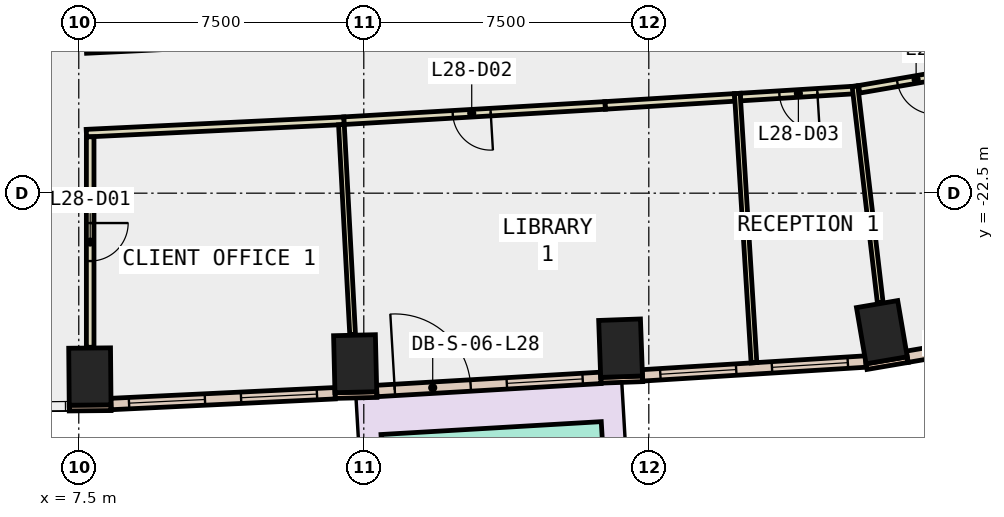
"""IFC4 building model, lengths in metres.
Left out: names, types, materials, properties, quantities, classifications, styles, units other than length and angle.
Written with IfcOpenShell. Run it as: python <this file> out.ifc"""

import sys

from ifc_helpers import new_model, si_unit, direction, frame, frame_2d, origin, origin_2d, place, context, subcontext, project, spatial, rectangle, extrude, element, fill, save


model = new_model("IFC4")
c1 = context("Model", 3, precision=1e-05, world=origin(), true_north=direction((0.0, 1.0)))
c2 = subcontext(c1, "Body", "Model", "MODEL_VIEW")
j1 = project(units=[si_unit("LENGTHUNIT", "METRE"), si_unit("PLANEANGLEUNIT", "RADIAN")], contexts=[c1])
p1 = place(None, origin())
s1 = spatial("IfcSite", under=j1, at=p1, CompositionType="ELEMENT")
p2 = place(p1, origin())
s2 = spatial("IfcBuilding", under=s1, at=p2, CompositionType="ELEMENT")
p3 = place(p2, frame((0.0, 0.0, 128.6)))
s3 = spatial("IfcBuildingStorey", under=s2, at=p3, CompositionType="ELEMENT", Elevation=128.6)
for number, where, z_axis, x_axis in (
    (1, (7.792, -27.325, -0.4), (0.0, 0.0, 1.0), (1.0, 0.009, 0.0)),
    (2, (14.773, -26.987, -0.4), (0.0, 0.0, 1.0), (1.0, 0.024, 0.0)),
    (3, (21.757, -26.579, -0.4), (0.0, 0.0, 1.0), (0.999, 0.035, 0.0)),
    (4, (28.633, -26.158, -0.4), (0.0, 0.0, 1.0), (0.986, 0.168, 0.0)),
):
    element("IfcColumn", number, at=place(p3, frame(where, z_axis=z_axis, x_axis=x_axis)), inside=s3, PredefinedType="COLUMN", context=c2, shape_type="SweptSolid", body=[
        extrude(rectangle(XDim=1.1, YDim=1.5, at=origin_2d()), origin(), (0.0, 0.0, 1.0), 4.0),
    ])
p4 = place(p3, frame((7.249, -28.155, 0.0), z_axis=(0.0, 0.0, 1.0), x_axis=(0.99995860686, 0.009098602504, 0.0)))
e5 = element("IfcWall", 5, at=p4, inside=s3, PredefinedType="STANDARD", context=c2, shape_type="SweptSolid", body=[
    extrude(rectangle(XDim=1.1, YDim=0.15, at=frame_2d((0.55, 0.0))), origin(), (0.0, 0.0, 1.0), 3.6),
])
p5 = place(p3, frame((14.243, -27.825, 0.0), z_axis=(0.0, 0.0, 1.0), x_axis=(0.999723421029, 0.023517683673, 0.0)))
e6 = element("IfcWall", 6, at=p5, inside=s3, PredefinedType="STANDARD", context=c2, shape_type="SweptSolid", body=[
    extrude(rectangle(XDim=1.1, YDim=0.15, at=frame_2d((0.55, 0.0))), origin(), (0.0, 0.0, 1.0), 3.6),
])
p6 = place(p3, frame((21.237, -27.423, 0.0), z_axis=(0.0, 0.0, 1.0), x_axis=(0.999368780235, 0.035525217693, 0.0)))
e7 = element("IfcWall", 7, at=p6, inside=s3, PredefinedType="STANDARD", context=c2, shape_type="SweptSolid", body=[
    extrude(rectangle(XDim=1.1, YDim=0.15, at=frame_2d((0.55, 0.0))), origin(), (0.0, 0.0, 1.0), 3.6),
])
p7 = place(p3, frame((28.229, -27.064, 0.0), z_axis=(0.0, 0.0, 1.0), x_axis=(0.985763338892, 0.168138751323, 0.0)))
e8 = element("IfcWall", 8, at=p7, inside=s3, PredefinedType="STANDARD", context=c2, shape_type="SweptSolid", body=[
    extrude(rectangle(XDim=1.101, YDim=0.15, at=frame_2d((0.55, 0.0))), origin(), (0.0, 0.0, 1.0), 3.6),
])
p8 = place(p3, frame((8.347, -28.048, 0.0), z_axis=(0.0, 0.0, 1.0), x_axis=(0.998840459798, 0.048142869367, 0.0)))
e9 = element("IfcWall", 9, at=p8, inside=s3, PredefinedType="STANDARD", context=c2, shape_type="SweptSolid", body=[
    extrude(rectangle(XDim=5.903, YDim=0.3, at=frame_2d((2.951, 0.0))), origin(), (0.0, 0.0, 1.0), 3.6),
])
p9 = place(p8, frame((0.476, 0.0, 0.9)))
e10 = element("IfcOpeningElement", 10, at=p9, cuts=e9, PredefinedType="OPENING", context=c2, shape_type="SweptSolid", body=[
    extrude(rectangle(XDim=2.0, YDim=2.6, at=frame_2d((1.0, 1.3))), frame((0.0, 0.16, 0.0), z_axis=(0.0, -1.0, 0.0), x_axis=(1.0, 0.0, 0.0)), (0.0, 0.0, 1.0), 0.32),
])
p10 = place(p8, frame((3.427, 0.0, 0.9)))
e11 = element("IfcOpeningElement", 11, at=p10, cuts=e9, PredefinedType="OPENING", context=c2, shape_type="SweptSolid", body=[
    extrude(rectangle(XDim=2.0, YDim=2.6, at=frame_2d((1.0, 1.3))), frame((0.0, 0.16, 0.0), z_axis=(0.0, -1.0, 0.0), x_axis=(1.0, 0.0, 0.0)), (0.0, 0.0, 1.0), 0.32),
])
p11 = place(p3, frame((15.34, -27.705, 0.0), z_axis=(0.0, 0.0, 1.0), x_axis=(0.998292147894, 0.058419067546, 0.0)))
e12 = element("IfcWall", 12, at=p11, inside=s3, PredefinedType="STANDARD", context=c2, shape_type="SweptSolid", body=[
    extrude(rectangle(XDim=5.905, YDim=0.3, at=frame_2d((2.953, 0.0))), origin(), (0.0, 0.0, 1.0), 3.6),
])
p12 = place(p11, frame((0.476, 0.0, 0.0)))
e13 = element("IfcOpeningElement", 13, at=p12, cuts=e12, PredefinedType="OPENING", context=c2, shape_type="SweptSolid", body=[
    extrude(rectangle(XDim=2.0, YDim=2.4, at=frame_2d((1.0, 1.2))), frame((0.0, 0.16, 0.0), z_axis=(0.0, -1.0, 0.0), x_axis=(1.0, 0.0, 0.0)), (0.0, 0.0, 1.0), 0.32),
])
p13 = place(p11, frame((3.429, 0.0, 0.9)))
e14 = element("IfcOpeningElement", 14, at=p13, cuts=e12, PredefinedType="OPENING", context=c2, shape_type="SweptSolid", body=[
    extrude(rectangle(XDim=2.0, YDim=2.6, at=frame_2d((1.0, 1.3))), frame((0.0, 0.16, 0.0), z_axis=(0.0, -1.0, 0.0), x_axis=(1.0, 0.0, 0.0)), (0.0, 0.0, 1.0), 0.32),
])
p14 = place(p3, frame((22.332, -27.294, 0.0), z_axis=(0.0, 0.0, 1.0), x_axis=(0.998086636664, 0.061830944626, 0.0)))
e15 = element("IfcWall", 15, at=p14, inside=s3, PredefinedType="STANDARD", context=c2, shape_type="SweptSolid", body=[
    extrude(rectangle(XDim=5.887, YDim=0.3, at=frame_2d((2.944, 0.0))), origin(), (0.0, 0.0, 1.0), 3.6),
])
p15 = place(p14, frame((0.472, 0.0, 0.9)))
e16 = element("IfcOpeningElement", 16, at=p15, cuts=e15, PredefinedType="OPENING", context=c2, shape_type="SweptSolid", body=[
    extrude(rectangle(XDim=2.0, YDim=2.6, at=frame_2d((1.0, 1.3))), frame((0.0, 0.16, 0.0), z_axis=(0.0, -1.0, 0.0), x_axis=(1.0, 0.0, 0.0)), (0.0, 0.0, 1.0), 0.32),
])
p16 = place(p14, frame((3.415, 0.0, 0.9)))
e17 = element("IfcOpeningElement", 17, at=p16, cuts=e15, PredefinedType="OPENING", context=c2, shape_type="SweptSolid", body=[
    extrude(rectangle(XDim=2.0, YDim=2.6, at=frame_2d((1.0, 1.3))), frame((0.0, 0.16, 0.0), z_axis=(0.0, -1.0, 0.0), x_axis=(1.0, 0.0, 0.0)), (0.0, 0.0, 1.0), 0.32),
])
p17 = place(p3, frame((29.3, -26.804, 0.0), z_axis=(0.0, 0.0, 1.0), x_axis=(0.985504881957, 0.169647067875, 0.0)))
e18 = element("IfcWall", 18, at=p17, inside=s3, PredefinedType="STANDARD", context=c2, shape_type="SweptSolid", body=[
    extrude(rectangle(XDim=4.374, YDim=0.3, at=frame_2d((2.187, 0.0))), origin(), (0.0, 0.0, 1.0), 3.6),
])
p18 = place(p17, frame((1.487, 0.0, 0.9)))
e19 = element("IfcOpeningElement", 19, at=p18, cuts=e18, PredefinedType="OPENING", context=c2, shape_type="SweptSolid", body=[
    extrude(rectangle(XDim=1.4, YDim=2.6, at=frame_2d((0.7, 1.3))), frame((0.0, 0.16, 0.0), z_axis=(0.0, -1.0, 0.0), x_axis=(1.0, 0.0, 0.0)), (0.0, 0.0, 1.0), 0.32),
])
p19 = place(p3, frame((15.476, -29.25, 0.0), z_axis=(0.0, 0.0, 1.0), x_axis=(0.998292739561, 0.058408955992, 0.0)))
e20 = element("IfcWall", 20, at=p19, inside=s3, PredefinedType="STANDARD", context=c2, shape_type="SweptSolid", body=[
    extrude(rectangle(XDim=5.806, YDim=0.8, at=frame_2d((2.903, 0.0))), origin(), (0.0, 0.0, 1.0), 0.8),
])
p20 = place(p3, frame((7.7, -18.719, 0.0), z_axis=(0.0, 0.0, 1.0), x_axis=(0.998829118209, 0.048377604502, 0.0)))
e21 = element("IfcWall", 21, at=p20, inside=s3, PredefinedType="PARTITIONING", context=c2, shape_type="SweptSolid", body=[
    extrude(rectangle(XDim=6.596, YDim=0.2, at=frame_2d((3.298, 0.0))), origin(), (0.0, 0.0, 1.0), 3.6),
])
p21 = place(p3, frame((14.481, -20.594, 0.0), z_axis=(0.0, 0.0, 1.0), x_axis=(-0.998839976403, -0.048152897512, 0.0)))
e22 = element("IfcWall", 22, at=p21, inside=s3, PredefinedType="PARTITIONING", context=c2, shape_type="SweptSolid", body=[
    extrude(rectangle(XDim=6.789, YDim=0.2, at=frame_2d((3.395, 0.0))), origin(), (0.0, 0.0, 1.0), 3.6),
])
p22 = place(p3, frame((24.76, -19.98, 0.0), z_axis=(0.0, 0.0, 1.0), x_axis=(-0.998092137917, -0.061742078267, 0.0)))
e23 = element("IfcWall", 23, at=p22, inside=s3, PredefinedType="PARTITIONING", context=c2, shape_type="SweptSolid", body=[
    extrude(rectangle(XDim=3.417, YDim=0.2, at=frame_2d((1.708, 0.0))), origin(), (0.0, 0.0, 1.0), 3.6),
])
p23 = place(p3, frame((21.35, -20.191, 0.0), z_axis=(0.0, 0.0, 1.0), x_axis=(-0.998291094182, -0.058437071087, 0.0)))
e24 = element("IfcWall", 24, at=p23, inside=s3, PredefinedType="PARTITIONING", context=c2, shape_type="SweptSolid", body=[
    extrude(rectangle(XDim=6.881, YDim=0.2, at=frame_2d((3.44, 0.0))), origin(), (0.0, 0.0, 1.0), 3.6),
])
p24 = place(p23, frame((3.016, 0.0, 0.0)))
e25 = element("IfcOpeningElement", 25, at=p24, cuts=e24, PredefinedType="OPENING", context=c2, shape_type="SweptSolid", body=[
    extrude(rectangle(XDim=1.0, YDim=2.1, at=frame_2d((0.5, 1.05))), frame((0.0, 0.11, 0.0), z_axis=(0.0, -1.0, 0.0), x_axis=(1.0, 0.0, 0.0)), (0.0, 0.0, 1.0), 0.22),
])
p25 = place(p3, frame((27.962, -19.782, 0.0), z_axis=(0.0, 0.0, 1.0), x_axis=(-0.998088756763, -0.061796712082, 0.0)))
e26 = element("IfcWall", 26, at=p25, inside=s3, PredefinedType="PARTITIONING", context=c2, shape_type="SweptSolid", body=[
    extrude(rectangle(XDim=3.058, YDim=0.2, at=frame_2d((1.529, 0.0))), origin(), (0.0, 0.0, 1.0), 3.6),
])
p26 = place(p25, frame((1.029, 0.0, 0.0)))
e27 = element("IfcOpeningElement", 27, at=p26, cuts=e26, PredefinedType="OPENING", context=c2, shape_type="SweptSolid", body=[
    extrude(rectangle(XDim=1.0, YDim=2.1, at=frame_2d((0.5, 1.05))), frame((0.0, 0.11, 0.0), z_axis=(0.0, -1.0, 0.0), x_axis=(1.0, 0.0, 0.0)), (0.0, 0.0, 1.0), 0.22),
])
p27 = place(p3, frame((31.033, -19.251, 0.0), z_axis=(0.0, 0.0, 1.0), x_axis=(-0.985494394638, -0.169707979005, 0.0)))
e28 = element("IfcWall", 28, at=p27, inside=s3, PredefinedType="PARTITIONING", context=c2, shape_type="SweptSolid", body=[
    extrude(rectangle(XDim=3.041, YDim=0.2, at=frame_2d((1.521, 0.0))), origin(), (0.0, 0.0, 1.0), 3.6),
])
p28 = place(p27, frame((1.021, 0.0, 0.0)))
e29 = element("IfcOpeningElement", 29, at=p28, cuts=e28, PredefinedType="OPENING", context=c2, shape_type="SweptSolid", body=[
    extrude(rectangle(XDim=1.0, YDim=2.1, at=frame_2d((0.5, 1.05))), frame((0.0, 0.11, 0.0), z_axis=(0.0, -1.0, 0.0), x_axis=(1.0, 0.0, 0.0)), (0.0, 0.0, 1.0), 0.22),
])
p29 = place(p3, frame((7.8, -21.017, 0.0), z_axis=(0.0, 0.0, 1.0), x_axis=(0.0, -1.0, 0.0)))
e30 = element("IfcWall", 30, at=p29, inside=s3, PredefinedType="PARTITIONING", context=c2, shape_type="SweptSolid", body=[
    extrude(rectangle(XDim=5.538, YDim=0.2, at=frame_2d((2.769, 0.0))), origin(), (0.0, 0.0, 1.0), 3.6),
])
p30 = place(p29, frame((2.269, 0.0, 0.0)))
e31 = element("IfcOpeningElement", 31, at=p30, cuts=e30, PredefinedType="OPENING", context=c2, shape_type="SweptSolid", body=[
    extrude(rectangle(XDim=1.0, YDim=2.1, at=frame_2d((0.5, 1.05))), frame((0.0, 0.11, 0.0), z_axis=(0.0, -1.0, 0.0), x_axis=(1.0, 0.0, 0.0)), (0.0, 0.0, 1.0), 0.22),
])
p31 = place(p3, frame((14.411, -20.697, 0.0), z_axis=(0.0, 0.0, 1.0), x_axis=(0.053386216168, -0.998573939137, 0.0)))
e32 = element("IfcWall", 32, at=p31, inside=s3, PredefinedType="PARTITIONING", context=c2, shape_type="SweptSolid", body=[
    extrude(rectangle(XDim=5.529, YDim=0.15, at=frame_2d((2.764, 0.0))), origin(), (0.0, 0.0, 1.0), 3.6),
])
p32 = place(p3, frame((24.829, -19.876, 0.0), z_axis=(0.0, 0.0, 1.0), x_axis=(0.061693175316, -0.998095161856, 0.0)))
e33 = element("IfcWall", 33, at=p32, inside=s3, PredefinedType="PARTITIONING", context=c2, shape_type="SweptSolid", body=[
    extrude(rectangle(XDim=7.099, YDim=0.15, at=frame_2d((3.55, 0.0))), origin(), (0.0, 0.0, 1.0), 3.6),
])
p33 = place(p3, frame((27.925, -19.684, 0.0), z_axis=(0.0, 0.0, 1.0), x_axis=(0.115888394456, -0.993262241319, 0.0)))
e34 = element("IfcWall", 34, at=p33, inside=s3, PredefinedType="PARTITIONING", context=c2, shape_type="SweptSolid", body=[
    extrude(rectangle(XDim=5.739, YDim=0.15, at=frame_2d((2.869, 0.0))), origin(), (0.0, 0.0, 1.0), 3.6),
])
p34 = place(p9, origin())
e35 = element("IfcWindow", 35, at=p34, inside=s3, PartitioningType="SINGLE_PANEL", PredefinedType="WINDOW", context=c2, shape_type="SweptSolid", body=[
    extrude(rectangle(XDim=2.0, YDim=2.6, at=frame_2d((1.0, 1.3))), frame((0.0, 0.03, 0.0), z_axis=(0.0, -1.0, 0.0), x_axis=(1.0, 0.0, 0.0)), (0.0, 0.0, 1.0), 0.06),
])
fill(e10, e35)
p35 = place(p10, origin())
e36 = element("IfcWindow", 36, at=p35, inside=s3, PartitioningType="SINGLE_PANEL", PredefinedType="WINDOW", context=c2, shape_type="SweptSolid", body=[
    extrude(rectangle(XDim=2.0, YDim=2.6, at=frame_2d((1.0, 1.3))), frame((0.0, 0.03, 0.0), z_axis=(0.0, -1.0, 0.0), x_axis=(1.0, 0.0, 0.0)), (0.0, 0.0, 1.0), 0.06),
])
fill(e11, e36)
p36 = place(p12, origin())
e37 = element("IfcDoor", 37, at=p36, inside=s3, OperationType="SLIDING_TO_LEFT", PredefinedType="DOOR", context=c2, shape_type="SweptSolid", body=[
    extrude(rectangle(XDim=2.0, YDim=2.4, at=frame_2d((1.0, 1.2))), frame((0.0, 0.025, 0.0), z_axis=(0.0, -1.0, 0.0), x_axis=(1.0, 0.0, 0.0)), (0.0, 0.0, 1.0), 0.05),
])
fill(e13, e37)
p37 = place(p13, origin())
e38 = element("IfcWindow", 38, at=p37, inside=s3, PartitioningType="SINGLE_PANEL", PredefinedType="WINDOW", context=c2, shape_type="SweptSolid", body=[
    extrude(rectangle(XDim=2.0, YDim=2.6, at=frame_2d((1.0, 1.3))), frame((0.0, 0.03, 0.0), z_axis=(0.0, -1.0, 0.0), x_axis=(1.0, 0.0, 0.0)), (0.0, 0.0, 1.0), 0.06),
])
fill(e14, e38)
p38 = place(p15, origin())
e39 = element("IfcWindow", 39, at=p38, inside=s3, PartitioningType="SINGLE_PANEL", PredefinedType="WINDOW", context=c2, shape_type="SweptSolid", body=[
    extrude(rectangle(XDim=2.0, YDim=2.6, at=frame_2d((1.0, 1.3))), frame((0.0, 0.03, 0.0), z_axis=(0.0, -1.0, 0.0), x_axis=(1.0, 0.0, 0.0)), (0.0, 0.0, 1.0), 0.06),
])
fill(e16, e39)
p39 = place(p16, origin())
e40 = element("IfcWindow", 40, at=p39, inside=s3, PartitioningType="SINGLE_PANEL", PredefinedType="WINDOW", context=c2, shape_type="SweptSolid", body=[
    extrude(rectangle(XDim=2.0, YDim=2.6, at=frame_2d((1.0, 1.3))), frame((0.0, 0.03, 0.0), z_axis=(0.0, -1.0, 0.0), x_axis=(1.0, 0.0, 0.0)), (0.0, 0.0, 1.0), 0.06),
])
fill(e17, e40)
p40 = place(p30, origin())
e41 = element("IfcDoor", 41, at=p40, inside=s3, OperationType="SINGLE_SWING_LEFT", PredefinedType="DOOR", context=c2, shape_type="SweptSolid", body=[
    extrude(rectangle(XDim=1.0, YDim=2.1, at=frame_2d((0.5, 1.05))), frame((0.0, 0.025, 0.0), z_axis=(0.0, -1.0, 0.0), x_axis=(1.0, 0.0, 0.0)), (0.0, 0.0, 1.0), 0.05),
])
fill(e31, e41)
p41 = place(p24, origin())
e42 = element("IfcDoor", 42, at=p41, inside=s3, OperationType="SINGLE_SWING_RIGHT", PredefinedType="DOOR", context=c2, shape_type="SweptSolid", body=[
    extrude(rectangle(XDim=1.0, YDim=2.1, at=frame_2d((0.5, 1.05))), frame((0.0, 0.025, 0.0), z_axis=(0.0, -1.0, 0.0), x_axis=(1.0, 0.0, 0.0)), (0.0, 0.0, 1.0), 0.05),
])
fill(e25, e42)
p42 = place(p26, origin())
e43 = element("IfcDoor", 43, at=p42, inside=s3, OperationType="SINGLE_SWING_RIGHT", PredefinedType="DOOR", context=c2, shape_type="SweptSolid", body=[
    extrude(rectangle(XDim=1.0, YDim=2.1, at=frame_2d((0.5, 1.05))), frame((0.0, 0.025, 0.0), z_axis=(0.0, -1.0, 0.0), x_axis=(1.0, 0.0, 0.0)), (0.0, 0.0, 1.0), 0.05),
])
fill(e27, e43)
p43 = place(p28, origin())
e44 = element("IfcDoor", 44, at=p43, inside=s3, OperationType="SINGLE_SWING_LEFT", PredefinedType="DOOR", context=c2, shape_type="SweptSolid", body=[
    extrude(rectangle(XDim=1.0, YDim=2.1, at=frame_2d((0.5, 1.05))), frame((0.0, 0.025, 0.0), z_axis=(0.0, -1.0, 0.0), x_axis=(1.0, 0.0, 0.0)), (0.0, 0.0, 1.0), 0.05),
])
fill(e29, e44)
save(model, sys.argv[1])
